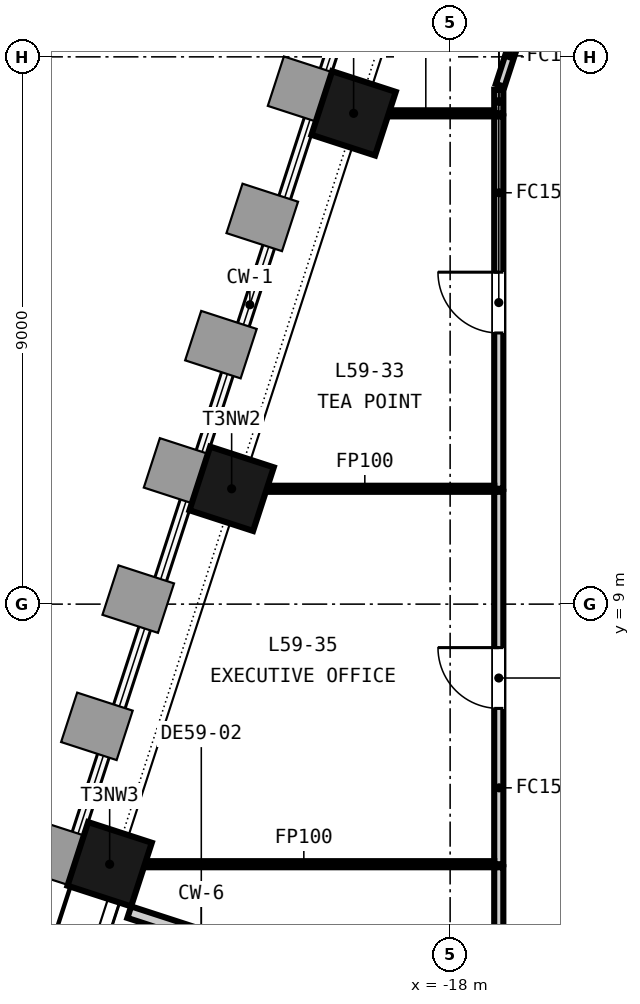
"""IFC4 building model, lengths in metres.
Left out: names, types, materials, properties, quantities, classifications, styles, units other than length and angle.
Written with IfcOpenShell. Run it as: python <this file> out.ifc"""

import sys

from ifc_helpers import new_model, si_unit, direction, frame, frame_2d, origin, origin_2d, place, context, subcontext, project, spatial, rectangle, extrude, element, fill, save


model = new_model("IFC4")
c1 = context("Model", 3, precision=1e-05, world=origin(), true_north=direction((0.0, 1.0)))
c2 = subcontext(c1, "Body", "Model", "MODEL_VIEW")
j1 = project(units=[si_unit("LENGTHUNIT", "METRE"), si_unit("PLANEANGLEUNIT", "RADIAN")], contexts=[c1])
p1 = place(None, origin())
s1 = spatial("IfcSite", under=j1, at=p1, CompositionType="ELEMENT")
p2 = place(p1, origin())
s2 = spatial("IfcBuilding", under=s1, at=p2, CompositionType="ELEMENT")
p3 = place(p2, frame((0.0, 0.0, 234.55)))
s3 = spatial("IfcBuildingStorey", under=s2, at=p3, CompositionType="ELEMENT", Elevation=234.55)
for number, where, z_axis, x_axis in (
    (1, (-19.587, 17.071, -0.15), (0.0, 0.0, 1.0), (-0.309, -0.951, 0.0)),
    (2, (-21.593, 10.897, -0.15), (0.0, 0.0, 1.0), (-0.309, -0.951, 0.0)),
    (3, (-23.599, 4.723, -0.15), (0.0, 0.0, 1.0), (-0.309, -0.951, 0.0)),
):
    element("IfcColumn", number, at=place(p3, frame(where, z_axis=z_axis, x_axis=x_axis)), inside=s3, PredefinedType="COLUMN", context=c2, shape_type="SweptSolid", body=[
        extrude(rectangle(XDim=1.1, YDim=1.1, at=origin_2d()), origin(), (0.0, 0.0, 1.0), 3.65),
    ])
p4 = place(p3, frame((-23.277, 3.934, 0.0), z_axis=(0.0, 0.0, 1.0), x_axis=(0.951055771678, -0.309019286062, 0.0)))
e4 = element("IfcWall", 4, at=p4, inside=s3, PredefinedType="SOLIDWALL", context=c2, shape_type="SweptSolid", body=[
    extrude(rectangle(XDim=1.984, YDim=0.2, at=frame_2d((0.992, 0.0))), origin(), (0.0, 0.0, 1.0), 3.05),
])
p5 = place(p3, frame((-17.2, 17.071, 0.0), z_axis=(0.0, 0.0, 1.0), x_axis=(0.0, 1.0, 0.0)))
e5 = element("IfcWall", 5, at=p5, inside=s3, PredefinedType="PARTITIONING", context=c2, shape_type="SweptSolid", body=[
    extrude(rectangle(XDim=0.389, YDim=0.15, at=frame_2d((0.194, 0.0))), origin(), (0.0, 0.0, 1.0), 2.751),
])
p6 = place(p3, frame((-17.177, 17.531, 0.0), z_axis=(0.0, 0.0, 1.0), x_axis=(0.30895599646, 0.951076333556, 0.0)))
e6 = element("IfcWall", 6, at=p6, inside=s3, PredefinedType="PARTITIONING", context=c2, shape_type="SweptSolid", body=[
    extrude(rectangle(XDim=1.019, YDim=0.15, at=frame_2d((0.509, 0.0))), origin(), (0.0, 0.0, 1.0), 2.751),
])
p7 = place(p3, frame((-19.535, 17.071, 0.0), z_axis=(0.0, 0.0, 1.0), x_axis=(1.0, 0.0, 0.0)))
e7 = element("IfcWall", 7, at=p7, inside=s3, PredefinedType="PARTITIONING", context=c2, shape_type="SweptSolid", body=[
    extrude(rectangle(XDim=2.26, YDim=0.1, at=frame_2d((1.13, 0.0))), origin(), (0.0, 0.0, 1.0), 2.751),
])
p8 = place(p3, frame((-17.2, 10.897, 0.0), z_axis=(0.0, 0.0, 1.0), x_axis=(0.0, 1.0, 0.0)))
e8 = element("IfcWall", 8, at=p8, inside=s3, PredefinedType="PARTITIONING", context=c2, shape_type="SweptSolid", body=[
    extrude(rectangle(XDim=6.124, YDim=0.15, at=frame_2d((3.062, 0.0))), origin(), (0.0, 0.0, 1.0), 2.751),
])
p9 = place(p8, frame((2.562, 0.0, 0.0)))
e9 = element("IfcOpeningElement", 9, at=p9, cuts=e8, PredefinedType="OPENING", context=c2, shape_type="SweptSolid", body=[
    extrude(rectangle(XDim=1.0, YDim=2.1, at=frame_2d((0.5, 1.05))), frame((0.0, 0.085, 0.0), z_axis=(0.0, -1.0, 0.0), x_axis=(1.0, 0.0, 0.0)), (0.0, 0.0, 1.0), 0.17),
])
p10 = place(p3, frame((-21.541, 10.897, 0.0), z_axis=(0.0, 0.0, 1.0), x_axis=(1.0, 0.0, 0.0)))
e10 = element("IfcWall", 10, at=p10, inside=s3, PredefinedType="PARTITIONING", context=c2, shape_type="SweptSolid", body=[
    extrude(rectangle(XDim=4.266, YDim=0.1, at=frame_2d((2.133, 0.0))), origin(), (0.0, 0.0, 1.0), 2.751),
])
p11 = place(p3, frame((-17.2, 4.723, 0.0), z_axis=(0.0, 0.0, 1.0), x_axis=(0.0, 1.0, 0.0)))
e11 = element("IfcWall", 11, at=p11, inside=s3, PredefinedType="PARTITIONING", context=c2, shape_type="SweptSolid", body=[
    extrude(rectangle(XDim=6.124, YDim=0.15, at=frame_2d((3.062, 0.0))), origin(), (0.0, 0.0, 1.0), 2.751),
])
p12 = place(p11, frame((2.562, 0.0, 0.0)))
e12 = element("IfcOpeningElement", 12, at=p12, cuts=e11, PredefinedType="OPENING", context=c2, shape_type="SweptSolid", body=[
    extrude(rectangle(XDim=1.0, YDim=2.1, at=frame_2d((0.5, 1.05))), frame((0.0, 0.085, 0.0), z_axis=(0.0, -1.0, 0.0), x_axis=(1.0, 0.0, 0.0)), (0.0, 0.0, 1.0), 0.17),
])
p13 = place(p3, frame((-23.547, 4.723, 0.0), z_axis=(0.0, 0.0, 1.0), x_axis=(1.0, 0.0, 0.0)))
e13 = element("IfcWall", 13, at=p13, inside=s3, PredefinedType="PARTITIONING", context=c2, shape_type="SweptSolid", body=[
    extrude(rectangle(XDim=6.272, YDim=0.1, at=frame_2d((3.136, 0.0))), origin(), (0.0, 0.0, 1.0), 2.751),
])
p14 = place(p3, frame((-17.2, -2.925, 0.0), z_axis=(0.0, 0.0, 1.0), x_axis=(0.0, 1.0, 0.0)))
e14 = element("IfcWall", 14, at=p14, inside=s3, PredefinedType="PARTITIONING", context=c2, shape_type="SweptSolid", body=[
    extrude(rectangle(XDim=7.598, YDim=0.15, at=frame_2d((3.799, 0.0))), origin(), (0.0, 0.0, 1.0), 2.751),
])
p15 = place(p14, frame((2.899, 0.0, 0.0)))
e15 = element("IfcOpeningElement", 15, at=p15, cuts=e14, PredefinedType="OPENING", context=c2, shape_type="SweptSolid", body=[
    extrude(rectangle(XDim=1.8, YDim=2.1, at=frame_2d((0.9, 1.05))), frame((0.0, 0.085, 0.0), z_axis=(0.0, -1.0, 0.0), x_axis=(1.0, 0.0, 0.0)), (0.0, 0.0, 1.0), 0.17),
])
p16 = place(p9, origin())
e16 = element("IfcDoor", 16, at=p16, inside=s3, OperationType="SINGLE_SWING_RIGHT", PredefinedType="DOOR", context=c2, shape_type="SweptSolid", body=[
    extrude(rectangle(XDim=1.0, YDim=2.1, at=frame_2d((0.5, 1.05))), frame((0.0, 0.025, 0.0), z_axis=(0.0, -1.0, 0.0), x_axis=(1.0, 0.0, 0.0)), (0.0, 0.0, 1.0), 0.05),
])
fill(e9, e16)
p17 = place(p12, origin())
e17 = element("IfcDoor", 17, at=p17, inside=s3, OperationType="SINGLE_SWING_RIGHT", PredefinedType="DOOR", context=c2, shape_type="SweptSolid", body=[
    extrude(rectangle(XDim=1.0, YDim=2.1, at=frame_2d((0.5, 1.05))), frame((0.0, 0.025, 0.0), z_axis=(0.0, -1.0, 0.0), x_axis=(1.0, 0.0, 0.0)), (0.0, 0.0, 1.0), 0.05),
])
fill(e12, e17)
save(model, sys.argv[1])
